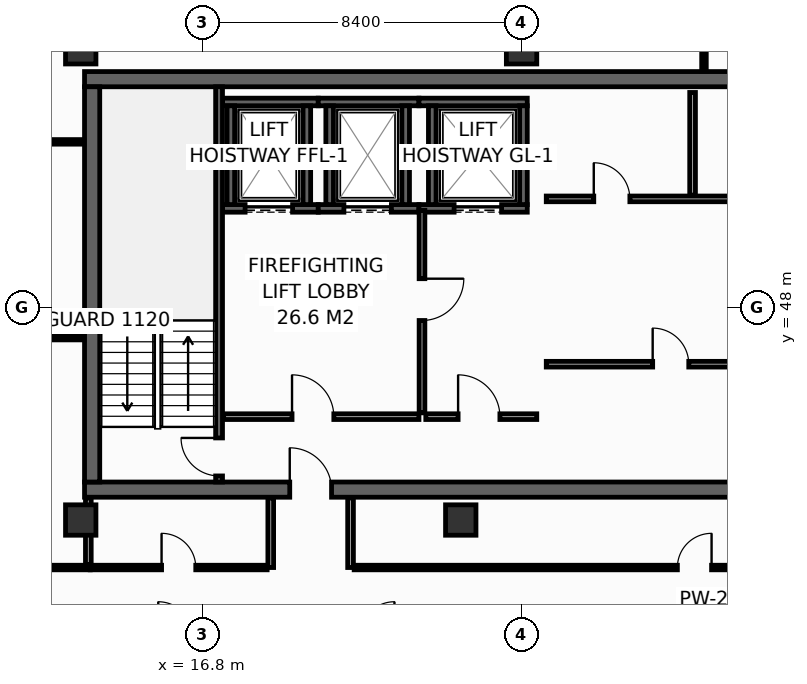
"""IFC4 building model, lengths in metres.
Left out: names, types, materials, properties, quantities, classifications, styles, units other than length and angle.
Written with IfcOpenShell. Run it as: python <this file> out.ifc"""

import sys

from ifc_helpers import new_model, si_unit, direction, frame, frame_2d, origin, origin_2d, place, context, subcontext, project, spatial, rectangle, hollow_rectangle, extrude, element, fill, save


model = new_model("IFC4")
c1 = context("Model", 3, precision=1e-05, world=origin(), true_north=direction((0.0, 1.0)))
c2 = subcontext(c1, "Body", "Model", "MODEL_VIEW")
j1 = project(units=[si_unit("LENGTHUNIT", "METRE"), si_unit("PLANEANGLEUNIT", "RADIAN")], contexts=[c1])
p1 = place(None, origin())
s1 = spatial("IfcSite", under=j1, at=p1, CompositionType="ELEMENT")
p2 = place(p1, origin())
s2 = spatial("IfcBuilding", under=s1, at=p2, CompositionType="ELEMENT")
p3 = place(p2, frame((0.0, 0.0, 242.0)))
s3 = spatial("IfcBuildingStorey", under=s2, at=p3, CompositionType="ELEMENT", Elevation=242.0)
p4 = place(p3, frame((13.7, 43.2, 0.0), z_axis=(0.0, 0.0, 1.0), x_axis=(1.0, 0.0, 0.0)))
e1 = element("IfcWall", 1, at=p4, inside=s3, PredefinedType="SHEAR", context=c2, shape_type="SweptSolid", body=[
    extrude(rectangle(XDim=32.5, YDim=0.4, at=frame_2d((16.25, 0.0))), origin(), (0.0, 0.0, 1.0), 3.55),
])
p5 = place(p4, frame((5.4, 0.0, 0.0)))
e2 = element("IfcOpeningElement", 2, at=p5, cuts=e1, PredefinedType="OPENING", context=c2, shape_type="SweptSolid", body=[
    extrude(rectangle(XDim=1.1, YDim=2.15, at=frame_2d((0.55, 1.075))), frame((0.0, 0.21, 0.0), z_axis=(0.0, -1.0, 0.0), x_axis=(1.0, 0.0, 0.0)), (0.0, 0.0, 1.0), 0.42),
])
p6 = place(p4, frame((25.6, 0.0, 0.0)))
e3 = element("IfcOpeningElement", 3, at=p6, cuts=e1, PredefinedType="OPENING", context=c2, shape_type="SweptSolid", body=[
    extrude(rectangle(XDim=1.1, YDim=2.15, at=frame_2d((0.55, 1.075))), frame((0.0, 0.21, 0.0), z_axis=(0.0, -1.0, 0.0), x_axis=(1.0, 0.0, 0.0)), (0.0, 0.0, 1.0), 0.42),
])
p7 = place(p3, frame((13.7, 54.0, 0.0), z_axis=(0.0, 0.0, 1.0), x_axis=(1.0, 0.0, 0.0)))
e4 = element("IfcWall", 4, at=p7, inside=s3, PredefinedType="SHEAR", context=c2, shape_type="SweptSolid", body=[
    extrude(rectangle(XDim=32.5, YDim=0.4, at=frame_2d((16.25, 0.0))), origin(), (0.0, 0.0, 1.0), 3.55),
])
p8 = place(p3, frame((13.9, 43.4, 0.0), z_axis=(0.0, 0.0, 1.0), x_axis=(0.0, 1.0, 0.0)))
e5 = element("IfcWall", 5, at=p8, inside=s3, PredefinedType="SHEAR", context=c2, shape_type="SweptSolid", body=[
    extrude(rectangle(XDim=10.4, YDim=0.4, at=frame_2d((5.2, 0.0))), origin(), (0.0, 0.0, 1.0), 3.55),
])
for number, where, z_axis, x_axis in (
    (6, (13.6, 54.8, 0.0), (0.0, 0.0, 1.0), (1.0, 0.0, 0.0)),
    (7, (25.2, 54.8, 0.0), (0.0, 0.0, 1.0), (1.0, 0.0, 0.0)),
    (8, (13.6, 42.4, 0.0), (0.0, 0.0, 1.0), (1.0, 0.0, 0.0)),
    (9, (23.6, 42.4, 0.0), (0.0, 0.0, 1.0), (1.0, 0.0, 0.0)),
):
    element("IfcColumn", number, at=place(p3, frame(where, z_axis=z_axis, x_axis=x_axis)), inside=s3, PredefinedType="COLUMN", context=c2, shape_type="SweptSolid", body=[
        extrude(hollow_rectangle(XDim=0.8, YDim=0.8, WallThickness=0.036, at=origin_2d()), origin(), (0.0, 0.0, 1.0), 3.8),
    ])
p9 = place(p3, frame((17.33, 50.6, 0.0), z_axis=(0.0, 0.0, 1.0), x_axis=(1.0, 0.0, 0.0)))
e10 = element("IfcWall", 10, at=p9, inside=s3, PredefinedType="SHEAR", context=c2, shape_type="SweptSolid", body=[
    extrude(rectangle(XDim=2.52, YDim=0.2, at=frame_2d((1.26, 0.0))), origin(), (0.0, 0.0, 1.0), 3.55),
])
p10 = place(p9, frame((0.595, 0.0, 0.0)))
e11 = element("IfcOpeningElement", 11, at=p10, cuts=e10, PredefinedType="OPENING", context=c2, shape_type="SweptSolid", body=[
    extrude(rectangle(XDim=1.25, YDim=2.3, at=frame_2d((0.625, 1.15))), frame((0.0, 0.11, 0.0), z_axis=(0.0, -1.0, 0.0), x_axis=(1.0, 0.0, 0.0)), (0.0, 0.0, 1.0), 0.22),
])
p11 = place(p3, frame((17.33, 53.4, 0.0), z_axis=(0.0, 0.0, 1.0), x_axis=(1.0, 0.0, 0.0)))
e12 = element("IfcWall", 12, at=p11, inside=s3, PredefinedType="SHEAR", context=c2, shape_type="SweptSolid", body=[
    extrude(rectangle(XDim=2.52, YDim=0.2, at=frame_2d((1.26, 0.0))), origin(), (0.0, 0.0, 1.0), 3.55),
])
for number, where, z_axis, x_axis in (
    (13, (17.55, 50.7, 0.0), (0.0, 0.0, 1.0), (0.0, 1.0, 0.0)),
    (14, (19.55, 50.7, 0.0), (0.0, 0.0, 1.0), (0.0, 1.0, 0.0)),
):
    element("IfcWall", number, at=place(p3, frame(where, z_axis=z_axis, x_axis=x_axis)), inside=s3, PredefinedType="SHEAR", context=c2, shape_type="SweptSolid", body=[
        extrude(rectangle(XDim=2.6, YDim=0.2, at=frame_2d((1.3, 0.0))), origin(), (0.0, 0.0, 1.0), 3.55),
    ])
p12 = place(p3, frame((19.85, 50.6, 0.0), z_axis=(0.0, 0.0, 1.0), x_axis=(1.0, 0.0, 0.0)))
e15 = element("IfcWall", 15, at=p12, inside=s3, PredefinedType="SHEAR", context=c2, shape_type="SweptSolid", body=[
    extrude(rectangle(XDim=2.65, YDim=0.2, at=frame_2d((1.325, 0.0))), origin(), (0.0, 0.0, 1.0), 3.55),
])
p13 = place(p12, frame((0.675, 0.0, 0.0)))
e16 = element("IfcOpeningElement", 16, at=p13, cuts=e15, PredefinedType="OPENING", context=c2, shape_type="SweptSolid", body=[
    extrude(rectangle(XDim=1.25, YDim=2.3, at=frame_2d((0.625, 1.15))), frame((0.0, 0.11, 0.0), z_axis=(0.0, -1.0, 0.0), x_axis=(1.0, 0.0, 0.0)), (0.0, 0.0, 1.0), 0.22),
])
p14 = place(p3, frame((19.85, 53.4, 0.0), z_axis=(0.0, 0.0, 1.0), x_axis=(1.0, 0.0, 0.0)))
e17 = element("IfcWall", 17, at=p14, inside=s3, PredefinedType="SHEAR", context=c2, shape_type="SweptSolid", body=[
    extrude(rectangle(XDim=2.65, YDim=0.2, at=frame_2d((1.325, 0.0))), origin(), (0.0, 0.0, 1.0), 3.55),
])
for number, where, z_axis, x_axis in (
    (18, (20.15, 50.7, 0.0), (0.0, 0.0, 1.0), (0.0, 1.0, 0.0)),
    (19, (22.15, 50.7, 0.0), (0.0, 0.0, 1.0), (0.0, 1.0, 0.0)),
):
    element("IfcWall", number, at=place(p3, frame(where, z_axis=z_axis, x_axis=x_axis)), inside=s3, PredefinedType="SHEAR", context=c2, shape_type="SweptSolid", body=[
        extrude(rectangle(XDim=2.6, YDim=0.2, at=frame_2d((1.3, 0.0))), origin(), (0.0, 0.0, 1.0), 3.55),
    ])
p15 = place(p3, frame((22.5, 50.6, 0.0), z_axis=(0.0, 0.0, 1.0), x_axis=(1.0, 0.0, 0.0)))
e20 = element("IfcWall", 20, at=p15, inside=s3, PredefinedType="SHEAR", context=c2, shape_type="SweptSolid", body=[
    extrude(rectangle(XDim=2.85, YDim=0.2, at=frame_2d((1.425, 0.0))), origin(), (0.0, 0.0, 1.0), 3.55),
])
p16 = place(p15, frame((0.925, 0.0, 0.0)))
e21 = element("IfcOpeningElement", 21, at=p16, cuts=e20, PredefinedType="OPENING", context=c2, shape_type="SweptSolid", body=[
    extrude(rectangle(XDim=1.25, YDim=2.3, at=frame_2d((0.625, 1.15))), frame((0.0, 0.11, 0.0), z_axis=(0.0, -1.0, 0.0), x_axis=(1.0, 0.0, 0.0)), (0.0, 0.0, 1.0), 0.22),
])
p17 = place(p3, frame((22.5, 53.4, 0.0), z_axis=(0.0, 0.0, 1.0), x_axis=(1.0, 0.0, 0.0)))
e22 = element("IfcWall", 22, at=p17, inside=s3, PredefinedType="SHEAR", context=c2, shape_type="SweptSolid", body=[
    extrude(rectangle(XDim=2.85, YDim=0.2, at=frame_2d((1.425, 0.0))), origin(), (0.0, 0.0, 1.0), 3.55),
])
for number, where, z_axis, x_axis in (
    (23, (22.85, 50.7, 0.0), (0.0, 0.0, 1.0), (0.0, 1.0, 0.0)),
    (24, (25.25, 50.7, 0.0), (0.0, 0.0, 1.0), (0.0, 1.0, 0.0)),
):
    element("IfcWall", number, at=place(p3, frame(where, z_axis=z_axis, x_axis=x_axis)), inside=s3, PredefinedType="SHEAR", context=c2, shape_type="SweptSolid", body=[
        extrude(rectangle(XDim=2.6, YDim=0.2, at=frame_2d((1.3, 0.0))), origin(), (0.0, 0.0, 1.0), 3.55),
    ])
p18 = place(p3, frame((17.24, 43.4, 0.0), z_axis=(0.0, 0.0, 1.0), x_axis=(0.0, 1.0, 0.0)))
e25 = element("IfcWall", 25, at=p18, inside=s3, PredefinedType="SHEAR", context=c2, shape_type="SweptSolid", body=[
    extrude(rectangle(XDim=10.4, YDim=0.18, at=frame_2d((5.2, 0.0))), origin(), (0.0, 0.0, 1.0), 3.55),
])
p19 = place(p18, frame((0.16, 0.0, 0.0)))
e26 = element("IfcOpeningElement", 26, at=p19, cuts=e25, PredefinedType="OPENING", context=c2, shape_type="SweptSolid", body=[
    extrude(rectangle(XDim=1.0, YDim=2.15, at=frame_2d((0.5, 1.075))), frame((0.0, 0.1, 0.0), z_axis=(0.0, -1.0, 0.0), x_axis=(1.0, 0.0, 0.0)), (0.0, 0.0, 1.0), 0.2),
])
p20 = place(p3, frame((17.36, 45.12, 0.0), z_axis=(0.0, 0.0, 1.0), x_axis=(1.0, 0.0, 0.0)))
e27 = element("IfcWall", 27, at=p20, inside=s3, PredefinedType="PARTITIONING", context=c2, shape_type="SweptSolid", body=[
    extrude(rectangle(XDim=5.14, YDim=0.15, at=frame_2d((2.57, 0.0))), origin(), (0.0, 0.0, 1.0), 3.55),
])
p21 = place(p20, frame((1.8, 0.0, 0.0)))
e28 = element("IfcOpeningElement", 28, at=p21, cuts=e27, PredefinedType="OPENING", context=c2, shape_type="SweptSolid", body=[
    extrude(rectangle(XDim=1.1, YDim=2.15, at=frame_2d((0.55, 1.075))), frame((0.0, 0.085, 0.0), z_axis=(0.0, -1.0, 0.0), x_axis=(1.0, 0.0, 0.0)), (0.0, 0.0, 1.0), 0.17),
])
p22 = place(p3, frame((22.58, 50.55, 0.0), z_axis=(0.0, 0.0, 1.0), x_axis=(0.0, -1.0, 0.0)))
e29 = element("IfcWall", 29, at=p22, inside=s3, PredefinedType="PARTITIONING", context=c2, shape_type="SweptSolid", body=[
    extrude(rectangle(XDim=5.33, YDim=0.15, at=frame_2d((2.665, 0.0))), origin(), (0.0, 0.0, 1.0), 3.55),
])
p23 = place(p22, frame((1.8, 0.0, 0.0)))
e30 = element("IfcOpeningElement", 30, at=p23, cuts=e29, PredefinedType="OPENING", context=c2, shape_type="SweptSolid", body=[
    extrude(rectangle(XDim=1.1, YDim=2.15, at=frame_2d((0.55, 1.075))), frame((0.0, 0.085, 0.0), z_axis=(0.0, -1.0, 0.0), x_axis=(1.0, 0.0, 0.0)), (0.0, 0.0, 1.0), 0.17),
])
p24 = place(p3, frame((22.68, 45.12, 0.0), z_axis=(0.0, 0.0, 1.0), x_axis=(1.0, 0.0, 0.0)))
e31 = element("IfcWall", 31, at=p24, inside=s3, PredefinedType="PARTITIONING", context=c2, shape_type="SweptSolid", body=[
    extrude(rectangle(XDim=2.92, YDim=0.15, at=frame_2d((1.46, 0.0))), origin(), (0.0, 0.0, 1.0), 3.55),
])
p25 = place(p24, frame((0.85, 0.0, 0.0)))
e32 = element("IfcOpeningElement", 32, at=p25, cuts=e31, PredefinedType="OPENING", context=c2, shape_type="SweptSolid", body=[
    extrude(rectangle(XDim=1.1, YDim=2.15, at=frame_2d((0.55, 1.075))), frame((0.0, 0.085, 0.0), z_axis=(0.0, -1.0, 0.0), x_axis=(1.0, 0.0, 0.0)), (0.0, 0.0, 1.0), 0.17),
])
p26 = place(p3, frame((25.85, 50.85, 0.0), z_axis=(0.0, 0.0, 1.0), x_axis=(1.0, 0.0, 0.0)))
e33 = element("IfcWall", 33, at=p26, inside=s3, PredefinedType="PARTITIONING", context=c2, shape_type="SweptSolid", body=[
    extrude(rectangle(XDim=7.65, YDim=0.15, at=frame_2d((3.825, 0.0))), origin(), (0.0, 0.0, 1.0), 3.55),
])
p27 = place(p26, frame((1.25, 0.0, 0.0)))
e34 = element("IfcOpeningElement", 34, at=p27, cuts=e33, PredefinedType="OPENING", context=c2, shape_type="SweptSolid", body=[
    extrude(rectangle(XDim=0.95, YDim=2.15, at=frame_2d((0.475, 1.075))), frame((0.0, 0.085, 0.0), z_axis=(0.0, -1.0, 0.0), x_axis=(1.0, 0.0, 0.0)), (0.0, 0.0, 1.0), 0.17),
])
p28 = place(p26, frame((5.05, 0.0, 0.0)))
e35 = element("IfcOpeningElement", 35, at=p28, cuts=e33, PredefinedType="OPENING", context=c2, shape_type="SweptSolid", body=[
    extrude(rectangle(XDim=0.95, YDim=2.15, at=frame_2d((0.475, 1.075))), frame((0.0, 0.085, 0.0), z_axis=(0.0, -1.0, 0.0), x_axis=(1.0, 0.0, 0.0)), (0.0, 0.0, 1.0), 0.17),
])
p29 = place(p3, frame((29.7, 50.95, 0.0), z_axis=(0.0, 0.0, 1.0), x_axis=(0.0, 1.0, 0.0)))
e36 = element("IfcWall", 36, at=p29, inside=s3, PredefinedType="PARTITIONING", context=c2, shape_type="SweptSolid", body=[
    extrude(rectangle(XDim=2.7, YDim=0.15, at=frame_2d((1.35, 0.0))), origin(), (0.0, 0.0, 1.0), 3.55),
])
p30 = place(p3, frame((25.85, 46.5, 0.0), z_axis=(0.0, 0.0, 1.0), x_axis=(1.0, 0.0, 0.0)))
e37 = element("IfcWall", 37, at=p30, inside=s3, PredefinedType="PARTITIONING", context=c2, shape_type="SweptSolid", body=[
    extrude(rectangle(XDim=7.65, YDim=0.15, at=frame_2d((3.825, 0.0))), origin(), (0.0, 0.0, 1.0), 3.55),
])
p31 = place(p30, frame((2.8, 0.0, 0.0)))
e38 = element("IfcOpeningElement", 38, at=p31, cuts=e37, PredefinedType="OPENING", context=c2, shape_type="SweptSolid", body=[
    extrude(rectangle(XDim=0.95, YDim=2.15, at=frame_2d((0.475, 1.075))), frame((0.0, 0.085, 0.0), z_axis=(0.0, -1.0, 0.0), x_axis=(1.0, 0.0, 0.0)), (0.0, 0.0, 1.0), 0.17),
])
p32 = place(p3, frame((11.5, 41.15, 0.0), z_axis=(0.0, 0.0, 1.0), x_axis=(1.0, 0.0, 0.0)))
e39 = element("IfcWall", 39, at=p32, inside=s3, PredefinedType="PARTITIONING", context=c2, shape_type="SweptSolid", body=[
    extrude(rectangle(XDim=2.35, YDim=0.12, at=frame_2d((1.175, 0.0))), origin(), (0.0, 0.0, 1.0), 3.55),
])
p33 = place(p3, frame((11.55, 52.35, 0.0), z_axis=(0.0, 0.0, 1.0), x_axis=(1.0, 0.0, 0.0)))
e40 = element("IfcWall", 40, at=p33, inside=s3, PredefinedType="PARTITIONING", context=c2, shape_type="SweptSolid", body=[
    extrude(rectangle(XDim=2.13, YDim=0.12, at=frame_2d((1.065, 0.0))), origin(), (0.0, 0.0, 1.0), 3.55),
])
p34 = place(p3, frame((30.0, 54.22, 0.0), z_axis=(0.0, 0.0, 1.0), x_axis=(0.0, 1.0, 0.0)))
e41 = element("IfcWall", 41, at=p34, inside=s3, PredefinedType="PARTITIONING", context=c2, shape_type="SweptSolid", body=[
    extrude(rectangle(XDim=1.775, YDim=0.12, at=frame_2d((0.888, 0.0))), origin(), (0.0, 0.0, 1.0), 2.935),
])
p35 = place(p3, frame((11.55, 47.2, 0.0), z_axis=(0.0, 0.0, 1.0), x_axis=(1.0, 0.0, 0.0)))
e42 = element("IfcWall", 42, at=p35, inside=s3, PredefinedType="PARTITIONING", context=c2, shape_type="SweptSolid", body=[
    extrude(rectangle(XDim=2.13, YDim=0.12, at=frame_2d((1.065, 0.0))), origin(), (0.0, 0.0, 1.0), 3.55),
])
p36 = place(p3, frame((13.8, 41.23, 0.0), z_axis=(0.0, 0.0, 1.0), x_axis=(0.0, 1.0, 0.0)))
e43 = element("IfcWall", 43, at=p36, inside=s3, PredefinedType="PARTITIONING", context=c2, shape_type="SweptSolid", body=[
    extrude(rectangle(XDim=1.75, YDim=0.15, at=frame_2d((0.875, 0.0))), origin(), (0.0, 0.0, 1.0), 3.55),
])
for number, where, z_axis, x_axis in (
    (44, (18.6, 41.15, 0.0), (0.0, 0.0, 1.0), (0.0, 1.0, 0.0)),
    (45, (20.7, 41.15, 0.0), (0.0, 0.0, 1.0), (0.0, 1.0, 0.0)),
):
    element("IfcWall", number, at=place(p3, frame(where, z_axis=z_axis, x_axis=x_axis)), inside=s3, PredefinedType="PARTITIONING", context=c2, shape_type="SweptSolid", body=[
        extrude(rectangle(XDim=1.83, YDim=0.15, at=frame_2d((0.915, 0.0))), origin(), (0.0, 0.0, 1.0), 3.55),
    ])
p37 = place(p3, frame((13.85, 41.15, 0.0), z_axis=(0.0, 0.0, 1.0), x_axis=(1.0, 0.0, 0.0)))
e46 = element("IfcWall", 46, at=p37, inside=s3, PredefinedType="PARTITIONING", context=c2, shape_type="SweptSolid", body=[
    extrude(rectangle(XDim=4.655, YDim=0.12, at=frame_2d((2.327, 0.0))), origin(), (0.0, 0.0, 1.0), 3.55),
])
p38 = place(p37, frame((1.877, 0.0, 0.0)))
e47 = element("IfcOpeningElement", 47, at=p38, cuts=e46, PredefinedType="OPENING", context=c2, shape_type="SweptSolid", body=[
    extrude(rectangle(XDim=0.9, YDim=2.1, at=frame_2d((0.45, 1.05))), frame((0.0, 0.07, 0.0), z_axis=(0.0, -1.0, 0.0), x_axis=(1.0, 0.0, 0.0)), (0.0, 0.0, 1.0), 0.14),
])
p39 = place(p3, frame((20.795, 41.15, 0.0), z_axis=(0.0, 0.0, 1.0), x_axis=(1.0, 0.0, 0.0)))
e48 = element("IfcWall", 48, at=p39, inside=s3, PredefinedType="PARTITIONING", context=c2, shape_type="SweptSolid", body=[
    extrude(rectangle(XDim=17.91, YDim=0.12, at=frame_2d((8.955, 0.0))), origin(), (0.0, 0.0, 1.0), 2.947),
])
p40 = place(p39, frame((8.505, 0.0, 0.0)))
e49 = element("IfcOpeningElement", 49, at=p40, cuts=e48, PredefinedType="OPENING", context=c2, shape_type="SweptSolid", body=[
    extrude(rectangle(XDim=0.9, YDim=2.1, at=frame_2d((0.45, 1.05))), frame((0.0, 0.07, 0.0), z_axis=(0.0, -1.0, 0.0), x_axis=(1.0, 0.0, 0.0)), (0.0, 0.0, 1.0), 0.14),
])
p41 = place(p10, origin())
e50 = element("IfcDoor", 50, at=p41, inside=s3, OperationType="SLIDING_TO_LEFT", PredefinedType="DOOR", context=c2, shape_type="SweptSolid", body=[
    extrude(rectangle(XDim=1.25, YDim=2.3, at=frame_2d((0.625, 1.15))), frame((0.0, 0.025, 0.0), z_axis=(0.0, -1.0, 0.0), x_axis=(1.0, 0.0, 0.0)), (0.0, 0.0, 1.0), 0.05),
])
fill(e11, e50)
p42 = place(p13, origin())
e51 = element("IfcDoor", 51, at=p42, inside=s3, OperationType="SLIDING_TO_LEFT", PredefinedType="DOOR", context=c2, shape_type="SweptSolid", body=[
    extrude(rectangle(XDim=1.25, YDim=2.3, at=frame_2d((0.625, 1.15))), frame((0.0, 0.025, 0.0), z_axis=(0.0, -1.0, 0.0), x_axis=(1.0, 0.0, 0.0)), (0.0, 0.0, 1.0), 0.05),
])
fill(e16, e51)
p43 = place(p16, origin())
e52 = element("IfcDoor", 52, at=p43, inside=s3, OperationType="SLIDING_TO_LEFT", PredefinedType="DOOR", context=c2, shape_type="SweptSolid", body=[
    extrude(rectangle(XDim=1.25, YDim=2.3, at=frame_2d((0.625, 1.15))), frame((0.0, 0.025, 0.0), z_axis=(0.0, -1.0, 0.0), x_axis=(1.0, 0.0, 0.0)), (0.0, 0.0, 1.0), 0.05),
])
fill(e21, e52)
p44 = place(p19, origin())
e53 = element("IfcDoor", 53, at=p44, inside=s3, OperationType="SINGLE_SWING_RIGHT", PredefinedType="DOOR", context=c2, shape_type="SweptSolid", body=[
    extrude(rectangle(XDim=1.0, YDim=2.15, at=frame_2d((0.5, 1.075))), frame((0.0, 0.025, 0.0), z_axis=(0.0, -1.0, 0.0), x_axis=(1.0, 0.0, 0.0)), (0.0, 0.0, 1.0), 0.05),
])
fill(e26, e53)
p45 = place(p21, origin())
e54 = element("IfcDoor", 54, at=p45, inside=s3, OperationType="SINGLE_SWING_LEFT", PredefinedType="DOOR", context=c2, shape_type="SweptSolid", body=[
    extrude(rectangle(XDim=1.1, YDim=2.15, at=frame_2d((0.55, 1.075))), frame((0.0, 0.025, 0.0), z_axis=(0.0, -1.0, 0.0), x_axis=(1.0, 0.0, 0.0)), (0.0, 0.0, 1.0), 0.05),
])
fill(e28, e54)
p46 = place(p23, origin())
e55 = element("IfcDoor", 55, at=p46, inside=s3, OperationType="SINGLE_SWING_LEFT", PredefinedType="DOOR", context=c2, shape_type="SweptSolid", body=[
    extrude(rectangle(XDim=1.1, YDim=2.15, at=frame_2d((0.55, 1.075))), frame((0.0, 0.025, 0.0), z_axis=(0.0, -1.0, 0.0), x_axis=(1.0, 0.0, 0.0)), (0.0, 0.0, 1.0), 0.05),
])
fill(e30, e55)
p47 = place(p25, origin())
e56 = element("IfcDoor", 56, at=p47, inside=s3, OperationType="SINGLE_SWING_LEFT", PredefinedType="DOOR", context=c2, shape_type="SweptSolid", body=[
    extrude(rectangle(XDim=1.1, YDim=2.15, at=frame_2d((0.55, 1.075))), frame((0.0, 0.025, 0.0), z_axis=(0.0, -1.0, 0.0), x_axis=(1.0, 0.0, 0.0)), (0.0, 0.0, 1.0), 0.05),
])
fill(e32, e56)
p48 = place(p5, origin())
e57 = element("IfcDoor", 57, at=p48, inside=s3, OperationType="SINGLE_SWING_LEFT", PredefinedType="DOOR", context=c2, shape_type="SweptSolid", body=[
    extrude(rectangle(XDim=1.1, YDim=2.15, at=frame_2d((0.55, 1.075))), frame((0.0, 0.025, 0.0), z_axis=(0.0, -1.0, 0.0), x_axis=(1.0, 0.0, 0.0)), (0.0, 0.0, 1.0), 0.05),
])
fill(e2, e57)
p49 = place(p27, origin())
e58 = element("IfcDoor", 58, at=p49, inside=s3, OperationType="SINGLE_SWING_LEFT", PredefinedType="DOOR", context=c2, shape_type="SweptSolid", body=[
    extrude(rectangle(XDim=0.95, YDim=2.15, at=frame_2d((0.475, 1.075))), frame((0.0, 0.025, 0.0), z_axis=(0.0, -1.0, 0.0), x_axis=(1.0, 0.0, 0.0)), (0.0, 0.0, 1.0), 0.05),
])
fill(e34, e58)
p50 = place(p31, origin())
e59 = element("IfcDoor", 59, at=p50, inside=s3, OperationType="SINGLE_SWING_LEFT", PredefinedType="DOOR", context=c2, shape_type="SweptSolid", body=[
    extrude(rectangle(XDim=0.95, YDim=2.15, at=frame_2d((0.475, 1.075))), frame((0.0, 0.025, 0.0), z_axis=(0.0, -1.0, 0.0), x_axis=(1.0, 0.0, 0.0)), (0.0, 0.0, 1.0), 0.05),
])
fill(e38, e59)
p51 = place(p38, origin())
e60 = element("IfcDoor", 60, at=p51, inside=s3, OperationType="SINGLE_SWING_LEFT", PredefinedType="DOOR", context=c2, shape_type="SweptSolid", body=[
    extrude(rectangle(XDim=0.9, YDim=2.1, at=frame_2d((0.45, 1.05))), frame((0.0, 0.025, 0.0), z_axis=(0.0, -1.0, 0.0), x_axis=(1.0, 0.0, 0.0)), (0.0, 0.0, 1.0), 0.05),
])
fill(e47, e60)
p52 = place(p40, origin())
e61 = element("IfcDoor", 61, at=p52, inside=s3, OperationType="SINGLE_SWING_RIGHT", PredefinedType="DOOR", context=c2, shape_type="SweptSolid", body=[
    extrude(rectangle(XDim=0.9, YDim=2.1, at=frame_2d((0.45, 1.05))), frame((0.0, 0.025, 0.0), z_axis=(0.0, -1.0, 0.0), x_axis=(1.0, 0.0, 0.0)), (0.0, 0.0, 1.0), 0.05),
])
fill(e49, e61)
save(model, sys.argv[1])
